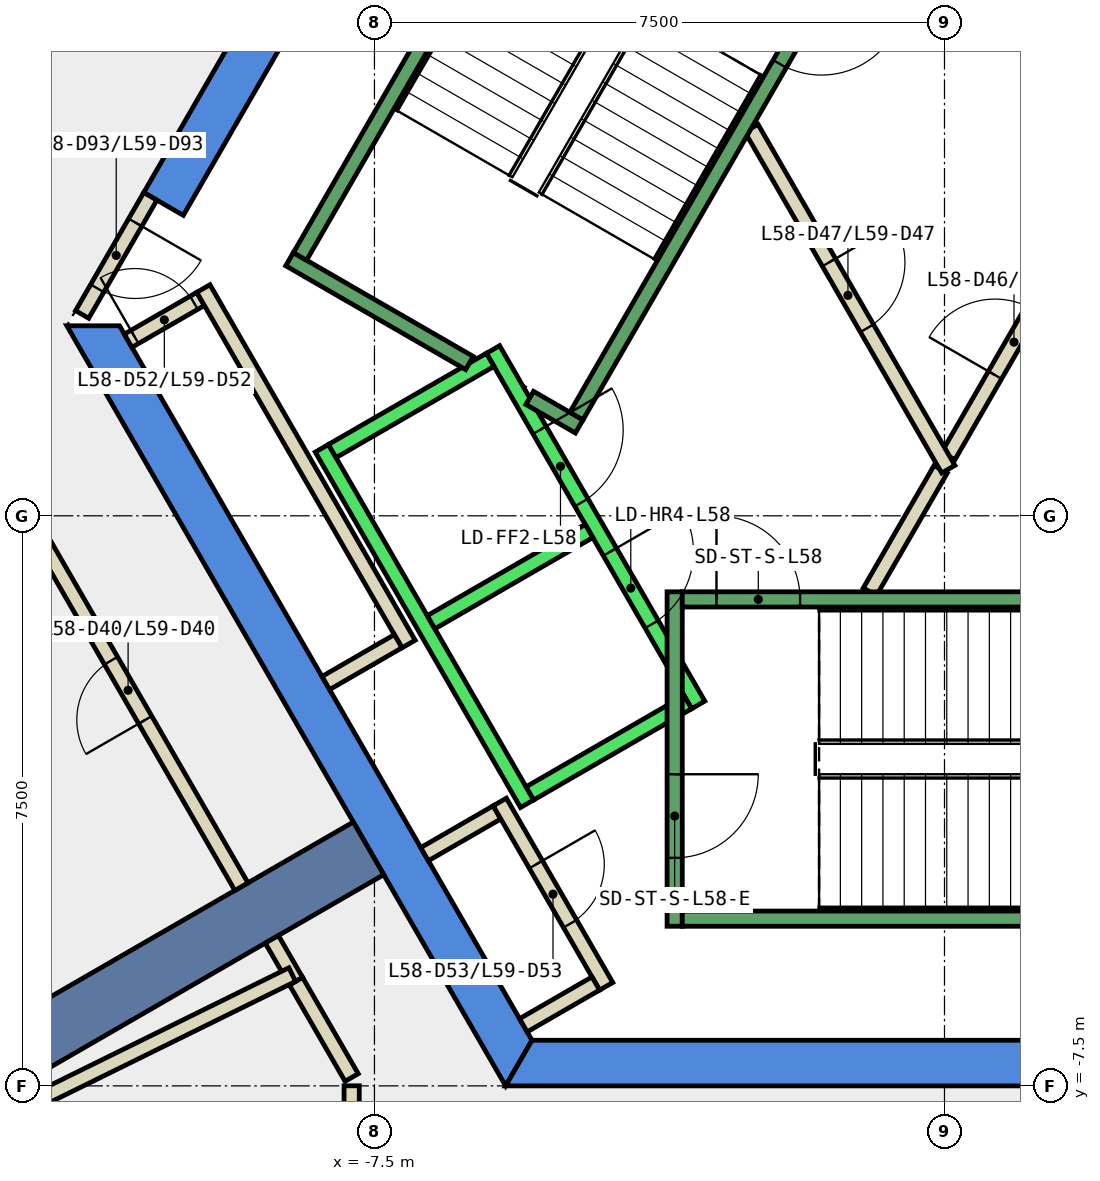
"""IFC4 building model, lengths in metres.
Left out: names, types, materials, properties, quantities, classifications, styles, units other than length and angle.
Written with IfcOpenShell. Run it as: python <this file> out.ifc"""

import sys

from ifc_helpers import new_model, si_unit, direction, frame, frame_2d, origin, place, context, subcontext, project, spatial, polyline, rectangle, outline, extrude, element, fill, save


model = new_model("IFC4")
c1 = context("Model", 3, precision=1e-05, world=origin(), true_north=direction((0.0, 1.0)))
c2 = subcontext(c1, "Body", "Model", "MODEL_VIEW")
j1 = project(units=[si_unit("LENGTHUNIT", "METRE"), si_unit("PLANEANGLEUNIT", "RADIAN")], contexts=[c1])
p1 = place(None, origin())
s1 = spatial("IfcSite", under=j1, at=p1, CompositionType="ELEMENT")
p2 = place(p1, origin())
s2 = spatial("IfcBuilding", under=s1, at=p2, CompositionType="ELEMENT")
p3 = place(p2, frame((0.0, 0.0, 255.8)))
s3 = spatial("IfcBuildingStorey", under=s2, at=p3, CompositionType="ELEMENT", Elevation=255.8)
p4 = place(p3, frame((0.0, 0.0, -0.34)))
e1 = element("IfcWall", 1, at=p4, inside=s3, PredefinedType="SHEAR", context=c2, shape_type="SweptSolid", body=[
    extrude(outline(polyline([(-10.535, 4.253), (-10.015, 3.953), (-5.427, 11.9), (-5.774, 12.5), (-10.535, 4.253)])), origin(), (0.0, 0.0, 1.0), 3.6),
])
p5 = place(p3, frame((0.0, 0.0, -0.34)))
e2 = element("IfcWall", 2, at=p5, inside=s3, PredefinedType="SHEAR", context=c2, shape_type="SweptSolid", body=[
    extrude(outline(polyline([(-11.547, 2.5), (-5.774, -7.5), (-5.427, -6.9), (-10.854, 2.5), (-11.547, 2.5)])), origin(), (0.0, 0.0, 1.0), 3.6),
])
p6 = place(p3, frame((0.0, 0.0, -0.34)))
e3 = element("IfcWall", 3, at=p6, inside=s3, PredefinedType="SHEAR", context=c2, shape_type="SweptSolid", body=[
    extrude(outline(polyline([(3.75, -7.5), (3.75, -6.9), (-5.427, -6.9), (-5.774, -7.5), (3.75, -7.5)])), origin(), (0.0, 0.0, 1.0), 3.6),
])
p7 = place(p3, frame((-7.578, -4.375, -0.34), z_axis=(0.0, 0.0, 1.0), x_axis=(-0.866024315419, -0.5000018851, 0.0)))
e4 = element("IfcWall", 4, at=p7, inside=s3, PredefinedType="SHEAR", context=c2, shape_type="SweptSolid", body=[
    extrude(rectangle(XDim=9.0, YDim=0.8, at=frame_2d((4.5, 0.0))), origin(), (0.0, 0.0, 1.0), 3.6),
])
p8 = place(p3, frame((-8.532, -6.123, 0.0), z_axis=(0.0, 0.0, 1.0), x_axis=(-0.499977104415, 0.866038622153, 0.0)))
e5 = element("IfcWall", 5, at=p8, inside=s3, PredefinedType="PARTITIONING", context=c2, shape_type="SweptSolid", body=[
    extrude(rectangle(XDim=0.636, YDim=0.2, at=frame_2d((0.318, 0.0))), origin(), (0.0, 0.0, 1.0), 3.26),
])
p9 = place(p3, frame((-7.8, -7.39, 0.0), z_axis=(0.0, 0.0, 1.0), x_axis=(-0.500266477503, 0.865871498253, 0.0)))
e6 = element("IfcWall", 6, at=p9, inside=s3, PredefinedType="PARTITIONING", context=c2, shape_type="SweptSolid", body=[
    extrude(rectangle(XDim=1.463, YDim=0.2, at=frame_2d((0.731, 0.0))), origin(), (0.0, 0.0, 1.0), 3.26),
])
p10 = place(p3, frame((-13.652, 4.224, 0.0), z_axis=(0.0, 0.0, 1.0), x_axis=(0.500221427001, 0.865897525097, 0.0)))
e7 = element("IfcWall", 7, at=p10, inside=s3, PredefinedType="PARTITIONING", context=c2, shape_type="SweptSolid", body=[
    extrude(rectangle(XDim=3.91, YDim=0.2, at=frame_2d((1.955, 0.0))), origin(), (0.0, 0.0, 1.0), 3.26),
])
p11 = place(p10, frame((1.505, 0.0, 0.0)))
e8 = element("IfcOpeningElement", 8, at=p11, cuts=e7, PredefinedType="OPENING", context=c2, shape_type="SweptSolid", body=[
    extrude(rectangle(XDim=1.0, YDim=2.1, at=frame_2d((0.5, 1.05))), frame((0.0, 0.11, 0.0), z_axis=(0.0, -1.0, 0.0), x_axis=(1.0, 0.0, 0.0)), (0.0, 0.0, 1.0), 0.22),
])
p12 = place(p3, frame((-10.741, 2.303, 0.0), z_axis=(0.0, 0.0, 1.0), x_axis=(0.866063652425, 0.499933745558, 0.0)))
e9 = element("IfcWall", 9, at=p12, inside=s3, PredefinedType="PARTITIONING", context=c2, shape_type="SweptSolid", body=[
    extrude(rectangle(XDim=1.1, YDim=0.2, at=frame_2d((0.55, 0.0))), origin(), (0.0, 0.0, 1.0), 3.26),
])
p13 = place(p12, frame((0.1, 0.0, 0.0)))
e10 = element("IfcOpeningElement", 10, at=p13, cuts=e9, PredefinedType="OPENING", context=c2, shape_type="SweptSolid", body=[
    extrude(rectangle(XDim=0.9, YDim=2.1, at=frame_2d((0.45, 1.05))), frame((0.0, 0.11, 0.0), z_axis=(0.0, -1.0, 0.0), x_axis=(1.0, 0.0, 0.0)), (0.0, 0.0, 1.0), 0.22),
])
p14 = place(p3, frame((-9.751, 2.99, 0.0), z_axis=(0.0, 0.0, 1.0), x_axis=(0.499955951776, -0.866050833545, 0.0)))
e11 = element("IfcWall", 11, at=p14, inside=s3, PredefinedType="PARTITIONING", context=c2, shape_type="SweptSolid", body=[
    extrude(rectangle(XDim=5.4, YDim=0.2, at=frame_2d((2.7, 0.0))), origin(), (0.0, 0.0, 1.0), 3.26),
])
p15 = place(p3, frame((-7.188, -1.65, 0.0), z_axis=(0.0, 0.0, 1.0), x_axis=(-0.865841558281, -0.500318294642, 0.0)))
e12 = element("IfcWall", 12, at=p15, inside=s3, PredefinedType="PARTITIONING", context=c2, shape_type="SweptSolid", body=[
    extrude(rectangle(XDim=1.099, YDim=0.2, at=frame_2d((0.55, 0.0))), origin(), (0.0, 0.0, 1.0), 3.26),
])
p16 = place(p3, frame((-6.841, -4.452, 0.0), z_axis=(0.0, 0.0, 1.0), x_axis=(0.86621513555, 0.499671230855, 0.0)))
e13 = element("IfcWall", 13, at=p16, inside=s3, PredefinedType="PARTITIONING", context=c2, shape_type="SweptSolid", body=[
    extrude(rectangle(XDim=1.1, YDim=0.2, at=frame_2d((0.55, 0.0))), origin(), (0.0, 0.0, 1.0), 3.26),
])
p17 = place(p3, frame((-5.851, -3.765, 0.0), z_axis=(0.0, 0.0, 1.0), x_axis=(0.500011755427, -0.866018616679, 0.0)))
e14 = element("IfcWall", 14, at=p17, inside=s3, PredefinedType="PARTITIONING", context=c2, shape_type="SweptSolid", body=[
    extrude(rectangle(XDim=2.8, YDim=0.2, at=frame_2d((1.4, 0.0))), origin(), (0.0, 0.0, 1.0), 3.26),
])
p18 = place(p17, frame((0.95, 0.0, 0.0)))
e15 = element("IfcOpeningElement", 15, at=p18, cuts=e14, PredefinedType="OPENING", context=c2, shape_type="SweptSolid", body=[
    extrude(rectangle(XDim=0.9, YDim=2.1, at=frame_2d((0.45, 1.05))), frame((0.0, 0.11, 0.0), z_axis=(0.0, -1.0, 0.0), x_axis=(1.0, 0.0, 0.0)), (0.0, 0.0, 1.0), 0.22),
])
p19 = place(p3, frame((-4.588, -6.153, 0.0), z_axis=(0.0, 0.0, 1.0), x_axis=(-0.86621513555, -0.499671230855, 0.0)))
e16 = element("IfcWall", 16, at=p19, inside=s3, PredefinedType="PARTITIONING", context=c2, shape_type="SweptSolid", body=[
    extrude(rectangle(XDim=1.1, YDim=0.2, at=frame_2d((0.55, 0.0))), origin(), (0.0, 0.0, 1.0), 3.26),
])
p20 = place(p3, frame((-0.982, -1.0, 0.0), z_axis=(0.0, 0.0, 1.0), x_axis=(0.50024047865, 0.865886518847, 0.0)))
e17 = element("IfcWall", 17, at=p20, inside=s3, PredefinedType="PARTITIONING", context=c2, shape_type="SweptSolid", body=[
    extrude(rectangle(XDim=1.863, YDim=0.2, at=frame_2d((0.931, 0.0))), origin(), (0.0, 0.0, 1.0), 3.26),
])
p21 = place(p3, frame((0.05, 0.787, 0.0), z_axis=(0.0, 0.0, 1.0), x_axis=(0.499954076797, 0.866051915934, 0.0)))
e18 = element("IfcWall", 18, at=p21, inside=s3, PredefinedType="PARTITIONING", context=c2, shape_type="SweptSolid", body=[
    extrude(rectangle(XDim=3.558, YDim=0.2, at=frame_2d((1.779, 0.0))), origin(), (0.0, 0.0, 1.0), 3.26),
])
p22 = place(p21, frame((1.229, 0.0, 0.0)))
e19 = element("IfcOpeningElement", 19, at=p22, cuts=e18, PredefinedType="OPENING", context=c2, shape_type="SweptSolid", body=[
    extrude(rectangle(XDim=1.0, YDim=2.1, at=frame_2d((0.5, 1.05))), frame((0.0, 0.11, 0.0), z_axis=(0.0, -1.0, 0.0), x_axis=(1.0, 0.0, 0.0)), (0.0, 0.0, 1.0), 0.22),
])
p23 = place(p3, frame((-2.54, 5.1, 0.0), z_axis=(0.0, 0.0, 1.0), x_axis=(0.499925051871, -0.866068670783, 0.0)))
e20 = element("IfcWall", 20, at=p23, inside=s3, PredefinedType="PARTITIONING", context=c2, shape_type="SweptSolid", body=[
    extrude(rectangle(XDim=5.181, YDim=0.2, at=frame_2d((2.59, 0.0))), origin(), (0.0, 0.0, 1.0), 3.26),
])
p24 = place(p23, frame((2.04, 0.0, 0.0)))
e21 = element("IfcOpeningElement", 21, at=p24, cuts=e20, PredefinedType="OPENING", context=c2, shape_type="SweptSolid", body=[
    extrude(rectangle(XDim=1.0, YDim=2.1, at=frame_2d((0.5, 1.05))), frame((0.0, 0.11, 0.0), z_axis=(0.0, -1.0, 0.0), x_axis=(1.0, 0.0, 0.0)), (0.0, 0.0, 1.0), 0.22),
])
p25 = place(p3, frame((-7.8, -12.184, 0.0), z_axis=(0.0, 0.0, 1.0), x_axis=(0.0, 1.0, 0.0)))
e22 = element("IfcWall", 22, at=p25, inside=s3, PredefinedType="PARTITIONING", context=c2, shape_type="SweptSolid", body=[
    extrude(rectangle(XDim=4.685, YDim=0.2, at=frame_2d((2.343, 0.0))), origin(), (0.0, 0.0, 1.0), 3.26),
])
p26 = place(p3, frame((-8.582, -6.036, 0.0), z_axis=(0.0, 0.0, 1.0), x_axis=(-0.897105141673, -0.441817116897, 0.0)))
e23 = element("IfcWall", 23, at=p26, inside=s3, PredefinedType="PARTITIONING", context=c2, shape_type="SweptSolid", body=[
    extrude(rectangle(XDim=5.111, YDim=0.2, at=frame_2d((2.555, 0.0))), origin(), (0.0, 0.0, 1.0), 3.26),
])
p27 = place(p3, frame((-10.449, 4.203, 0.0), z_axis=(0.0, 0.0, 1.0), x_axis=(-0.499914839587, -0.866074565589, 0.0)))
e24 = element("IfcWall", 24, at=p27, inside=s3, PredefinedType="PARTITIONING", context=c2, shape_type="SweptSolid", body=[
    extrude(rectangle(XDim=1.794, YDim=0.2, at=frame_2d((0.897, 0.0))), origin(), (0.0, 0.0, 1.0), 2.4),
])
p28 = place(p27, frame((0.397, 0.0, 0.0)))
e25 = element("IfcOpeningElement", 25, at=p28, cuts=e24, PredefinedType="OPENING", context=c2, shape_type="SweptSolid", body=[
    extrude(rectangle(XDim=1.0, YDim=2.1, at=frame_2d((0.5, 1.05))), frame((0.0, 0.11, 0.0), z_axis=(0.0, -1.0, 0.0), x_axis=(1.0, 0.0, 0.0)), (0.0, 0.0, 1.0), 0.22),
])
p29 = place(p3, frame((-9.25, -4.879, 0.0), z_axis=(0.0, 0.0, 1.0), x_axis=(-0.499944124422, 0.866057661161, 0.0)))
e26 = element("IfcWall", 26, at=p29, inside=s3, PredefinedType="PARTITIONING", context=c2, shape_type="SweptSolid", body=[
    extrude(rectangle(XDim=7.405, YDim=0.2, at=frame_2d((3.702, 0.0))), origin(), (0.0, 0.0, 1.0), 3.26),
])
p30 = place(p29, frame((2.533, 0.0, 0.0)))
e27 = element("IfcOpeningElement", 27, at=p30, cuts=e26, PredefinedType="OPENING", context=c2, shape_type="SweptSolid", body=[
    extrude(rectangle(XDim=0.9, YDim=2.1, at=frame_2d((0.45, 1.05))), frame((0.0, 0.11, 0.0), z_axis=(0.0, -1.0, 0.0), x_axis=(1.0, 0.0, 0.0)), (0.0, 0.0, 1.0), 0.22),
])
p31 = place(p3, frame((-5.94, 2.188, 0.0), z_axis=(0.0, 0.0, 1.0), x_axis=(0.500034260056, -0.866005622828, 0.0)))
e28 = element("IfcWall", 28, at=p31, inside=s3, PredefinedType="STANDARD", context=c2, shape_type="SweptSolid", body=[
    extrude(rectangle(XDim=5.399, YDim=0.2, at=frame_2d((2.7, 0.0))), origin(), (0.0, 0.0, 1.0), 3.26),
])
p32 = place(p31, frame((3.075, 0.0, 0.0)))
e29 = element("IfcOpeningElement", 29, at=p32, cuts=e28, PredefinedType="OPENING", context=c2, shape_type="SweptSolid", body=[
    extrude(rectangle(XDim=1.1, YDim=2.1, at=frame_2d((0.55, 1.05))), frame((0.0, 0.11, 0.0), z_axis=(0.0, -1.0, 0.0), x_axis=(1.0, 0.0, 0.0)), (0.0, 0.0, 1.0), 0.22),
])
p33 = place(p31, frame((1.225, 0.0, 0.0)))
e30 = element("IfcOpeningElement", 30, at=p33, cuts=e28, PredefinedType="OPENING", context=c2, shape_type="SweptSolid", body=[
    extrude(rectangle(XDim=1.1, YDim=2.1, at=frame_2d((0.55, 1.05))), frame((0.0, 0.11, 0.0), z_axis=(0.0, -1.0, 0.0), x_axis=(1.0, 0.0, 0.0)), (0.0, 0.0, 1.0), 0.22),
])
p34 = place(p3, frame((-8.192, 0.888, 0.0), z_axis=(0.0, 0.0, 1.0), x_axis=(0.500034260056, -0.866005622828, 0.0)))
e31 = element("IfcWall", 31, at=p34, inside=s3, PredefinedType="STANDARD", context=c2, shape_type="SweptSolid", body=[
    extrude(rectangle(XDim=5.399, YDim=0.2, at=frame_2d((2.7, 0.0))), origin(), (0.0, 0.0, 1.0), 3.26),
])
for number, where, z_axis, x_axis in (
    (32, (-5.977, 2.052, 0.0), (0.0, 0.0, 1.0), (-0.866, -0.5, 0.0)),
    (33, (-4.677, -0.2, 0.0), (0.0, 0.0, 1.0), (-0.866, -0.5, 0.0)),
):
    element("IfcWall", number, at=place(p3, frame(where, z_axis=z_axis, x_axis=x_axis)), inside=s3, PredefinedType="STANDARD", context=c2, shape_type="SweptSolid", body=[
        extrude(rectangle(XDim=2.399, YDim=0.2, at=frame_2d((1.2, 0.0))), origin(), (0.0, 0.0, 1.0), 3.26),
    ])
p35 = place(p3, frame((-3.377, -2.452, 0.0), z_axis=(0.0, 0.0, 1.0), x_axis=(-0.865955154139, -0.50012165622, 0.0)))
e34 = element("IfcWall", 34, at=p35, inside=s3, PredefinedType="STANDARD", context=c2, shape_type="SweptSolid", body=[
    extrude(rectangle(XDim=2.4, YDim=0.2, at=frame_2d((1.2, 0.0))), origin(), (0.0, 0.0, 1.0), 3.26),
])
p36 = place(p3, frame((-3.55, -1.0, 0.0), z_axis=(0.0, 0.0, 1.0), x_axis=(0.0, -1.0, 0.0)))
e35 = element("IfcWall", 35, at=p36, inside=s3, PredefinedType="STANDARD", context=c2, shape_type="SweptSolid", body=[
    extrude(rectangle(XDim=4.4, YDim=0.2, at=frame_2d((2.2, 0.0))), origin(), (0.0, 0.0, 1.0), 3.26),
])
p37 = place(p36, frame((2.4, 0.0, 0.0)))
e36 = element("IfcOpeningElement", 36, at=p37, cuts=e35, PredefinedType="OPENING", context=c2, shape_type="SweptSolid", body=[
    extrude(rectangle(XDim=1.1, YDim=2.2, at=frame_2d((0.55, 1.1))), frame((0.0, 0.11, 0.0), z_axis=(0.0, -1.0, 0.0), x_axis=(1.0, 0.0, 0.0)), (0.0, 0.0, 1.0), 0.22),
])
p38 = place(p3, frame((-3.45, -1.1, 0.0), z_axis=(0.0, 0.0, 1.0), x_axis=(1.0, 0.0, 0.0)))
e37 = element("IfcWall", 37, at=p38, inside=s3, PredefinedType="STANDARD", context=c2, shape_type="SweptSolid", body=[
    extrude(rectangle(XDim=6.9, YDim=0.2, at=frame_2d((3.45, 0.0))), origin(), (0.0, 0.0, 1.0), 3.26),
])
p39 = place(p38, frame((0.45, 0.0, 0.0)))
e38 = element("IfcOpeningElement", 38, at=p39, cuts=e37, PredefinedType="OPENING", context=c2, shape_type="SweptSolid", body=[
    extrude(rectangle(XDim=1.1, YDim=2.2, at=frame_2d((0.55, 1.1))), frame((0.0, 0.11, 0.0), z_axis=(0.0, -1.0, 0.0), x_axis=(1.0, 0.0, 0.0)), (0.0, 0.0, 1.0), 0.22),
])
p40 = place(p3, frame((-3.45, -5.3, 0.0), z_axis=(0.0, 0.0, 1.0), x_axis=(1.0, 0.0, 0.0)))
e39 = element("IfcWall", 39, at=p40, inside=s3, PredefinedType="STANDARD", context=c2, shape_type="SweptSolid", body=[
    extrude(rectangle(XDim=6.9, YDim=0.2, at=frame_2d((3.45, 0.0))), origin(), (0.0, 0.0, 1.0), 3.26),
])
p41 = place(p3, frame((-6.25, 2.01, 0.0), z_axis=(0.0, 0.0, 1.0), x_axis=(-0.86611865017, 0.499838457731, 0.0)))
e40 = element("IfcWall", 40, at=p41, inside=s3, PredefinedType="STANDARD", context=c2, shape_type="SweptSolid", body=[
    extrude(rectangle(XDim=2.733, YDim=0.2, at=frame_2d((1.366, 0.0))), origin(), (0.0, 0.0, 1.0), 3.26),
])
p42 = place(p3, frame((-4.806, 1.176, 0.0), z_axis=(0.0, 0.0, 1.0), x_axis=(-0.866558586415, 0.499075361355, 0.0)))
e41 = element("IfcWall", 41, at=p42, inside=s3, PredefinedType="STANDARD", context=c2, shape_type="SweptSolid", body=[
    extrude(rectangle(XDim=0.751, YDim=0.2, at=frame_2d((0.376, 0.0))), origin(), (0.0, 0.0, 1.0), 3.26),
])
p43 = place(p3, frame((-1.393, 7.288, 0.0), z_axis=(0.0, 0.0, 1.0), x_axis=(-0.499963383562, -0.866046543262, 0.0)))
e42 = element("IfcWall", 42, at=p43, inside=s3, PredefinedType="STANDARD", context=c2, shape_type="SweptSolid", body=[
    extrude(rectangle(XDim=6.9, YDim=0.2, at=frame_2d((3.45, 0.0))), origin(), (0.0, 0.0, 1.0), 3.26),
])
p44 = place(p43, frame((0.45, 0.0, 0.0)))
e43 = element("IfcOpeningElement", 43, at=p44, cuts=e42, PredefinedType="OPENING", context=c2, shape_type="SweptSolid", body=[
    extrude(rectangle(XDim=1.1, YDim=2.2, at=frame_2d((0.55, 1.1))), frame((0.0, 0.11, 0.0), z_axis=(0.0, -1.0, 0.0), x_axis=(1.0, 0.0, 0.0)), (0.0, 0.0, 1.0), 0.22),
])
p45 = place(p3, frame((-5.03, 9.388, 0.0), z_axis=(0.0, 0.0, 1.0), x_axis=(-0.499978703459, -0.866037698999, 0.0)))
e44 = element("IfcWall", 44, at=p45, inside=s3, PredefinedType="STANDARD", context=c2, shape_type="SweptSolid", body=[
    extrude(rectangle(XDim=6.9, YDim=0.2, at=frame_2d((3.45, 0.0))), origin(), (0.0, 0.0, 1.0), 3.26),
])
p46 = place(p30, origin())
e45 = element("IfcDoor", 45, at=p46, inside=s3, OperationType="SINGLE_SWING_RIGHT", PredefinedType="DOOR", context=c2, shape_type="SweptSolid", body=[
    extrude(rectangle(XDim=0.9, YDim=2.1, at=frame_2d((0.45, 1.05))), frame((0.0, 0.025, 0.0), z_axis=(0.0, -1.0, 0.0), x_axis=(1.0, 0.0, 0.0)), (0.0, 0.0, 1.0), 0.05),
])
fill(e27, e45)
p47 = place(p22, origin())
e46 = element("IfcDoor", 46, at=p47, inside=s3, OperationType="SINGLE_SWING_RIGHT", PredefinedType="DOOR", context=c2, shape_type="SweptSolid", body=[
    extrude(rectangle(XDim=1.0, YDim=2.1, at=frame_2d((0.5, 1.05))), frame((0.0, 0.025, 0.0), z_axis=(0.0, -1.0, 0.0), x_axis=(1.0, 0.0, 0.0)), (0.0, 0.0, 1.0), 0.05),
])
fill(e19, e46)
p48 = place(p24, origin())
e47 = element("IfcDoor", 47, at=p48, inside=s3, OperationType="SINGLE_SWING_RIGHT", PredefinedType="DOOR", context=c2, shape_type="SweptSolid", body=[
    extrude(rectangle(XDim=1.0, YDim=2.1, at=frame_2d((0.5, 1.05))), frame((0.0, 0.025, 0.0), z_axis=(0.0, -1.0, 0.0), x_axis=(1.0, 0.0, 0.0)), (0.0, 0.0, 1.0), 0.05),
])
fill(e21, e47)
p49 = place(p13, origin())
e48 = element("IfcDoor", 48, at=p49, inside=s3, OperationType="SINGLE_SWING_RIGHT", PredefinedType="DOOR", context=c2, shape_type="SweptSolid", body=[
    extrude(rectangle(XDim=0.9, YDim=2.1, at=frame_2d((0.45, 1.05))), frame((0.0, 0.025, 0.0), z_axis=(0.0, -1.0, 0.0), x_axis=(1.0, 0.0, 0.0)), (0.0, 0.0, 1.0), 0.05),
])
fill(e10, e48)
p50 = place(p18, origin())
e49 = element("IfcDoor", 49, at=p50, inside=s3, OperationType="SINGLE_SWING_RIGHT", PredefinedType="DOOR", context=c2, shape_type="SweptSolid", body=[
    extrude(rectangle(XDim=0.9, YDim=2.1, at=frame_2d((0.45, 1.05))), frame((0.0, 0.025, 0.0), z_axis=(0.0, -1.0, 0.0), x_axis=(1.0, 0.0, 0.0)), (0.0, 0.0, 1.0), 0.05),
])
fill(e15, e49)
p51 = place(p28, origin())
e50 = element("IfcDoor", 50, at=p51, inside=s3, OperationType="SINGLE_SWING_LEFT", PredefinedType="DOOR", context=c2, shape_type="SweptSolid", body=[
    extrude(rectangle(XDim=1.0, YDim=2.1, at=frame_2d((0.5, 1.05))), frame((0.0, 0.025, 0.0), z_axis=(0.0, -1.0, 0.0), x_axis=(1.0, 0.0, 0.0)), (0.0, 0.0, 1.0), 0.05),
])
fill(e25, e50)
p52 = place(p32, origin())
e51 = element("IfcDoor", 51, at=p52, inside=s3, OperationType="SLIDING_TO_LEFT", PredefinedType="DOOR", context=c2, shape_type="SweptSolid", body=[
    extrude(rectangle(XDim=1.1, YDim=2.1, at=frame_2d((0.55, 1.05))), frame((0.0, 0.025, 0.0), z_axis=(0.0, -1.0, 0.0), x_axis=(1.0, 0.0, 0.0)), (0.0, 0.0, 1.0), 0.05),
])
fill(e29, e51)
p53 = place(p33, origin())
e52 = element("IfcDoor", 52, at=p53, inside=s3, OperationType="SLIDING_TO_LEFT", PredefinedType="DOOR", context=c2, shape_type="SweptSolid", body=[
    extrude(rectangle(XDim=1.1, YDim=2.1, at=frame_2d((0.55, 1.05))), frame((0.0, 0.025, 0.0), z_axis=(0.0, -1.0, 0.0), x_axis=(1.0, 0.0, 0.0)), (0.0, 0.0, 1.0), 0.05),
])
fill(e30, e52)
p54 = place(p39, origin())
e53 = element("IfcDoor", 53, at=p54, inside=s3, OperationType="SINGLE_SWING_LEFT", PredefinedType="DOOR", context=c2, shape_type="SweptSolid", body=[
    extrude(rectangle(XDim=1.1, YDim=2.2, at=frame_2d((0.55, 1.1))), frame((0.0, 0.025, 0.0), z_axis=(0.0, -1.0, 0.0), x_axis=(1.0, 0.0, 0.0)), (0.0, 0.0, 1.0), 0.05),
])
fill(e38, e53)
p55 = place(p37, origin())
e54 = element("IfcDoor", 54, at=p55, inside=s3, OperationType="SINGLE_SWING_LEFT", PredefinedType="DOOR", context=c2, shape_type="SweptSolid", body=[
    extrude(rectangle(XDim=1.1, YDim=2.2, at=frame_2d((0.55, 1.1))), frame((0.0, 0.025, 0.0), z_axis=(0.0, -1.0, 0.0), x_axis=(1.0, 0.0, 0.0)), (0.0, 0.0, 1.0), 0.05),
])
fill(e36, e54)
p56 = place(p44, origin())
e55 = element("IfcDoor", 55, at=p56, inside=s3, OperationType="SINGLE_SWING_LEFT", PredefinedType="DOOR", context=c2, shape_type="SweptSolid", body=[
    extrude(rectangle(XDim=1.1, YDim=2.2, at=frame_2d((0.55, 1.1))), frame((0.0, 0.025, 0.0), z_axis=(0.0, -1.0, 0.0), x_axis=(1.0, 0.0, 0.0)), (0.0, 0.0, 1.0), 0.05),
])
fill(e43, e55)
save(model, sys.argv[1])
